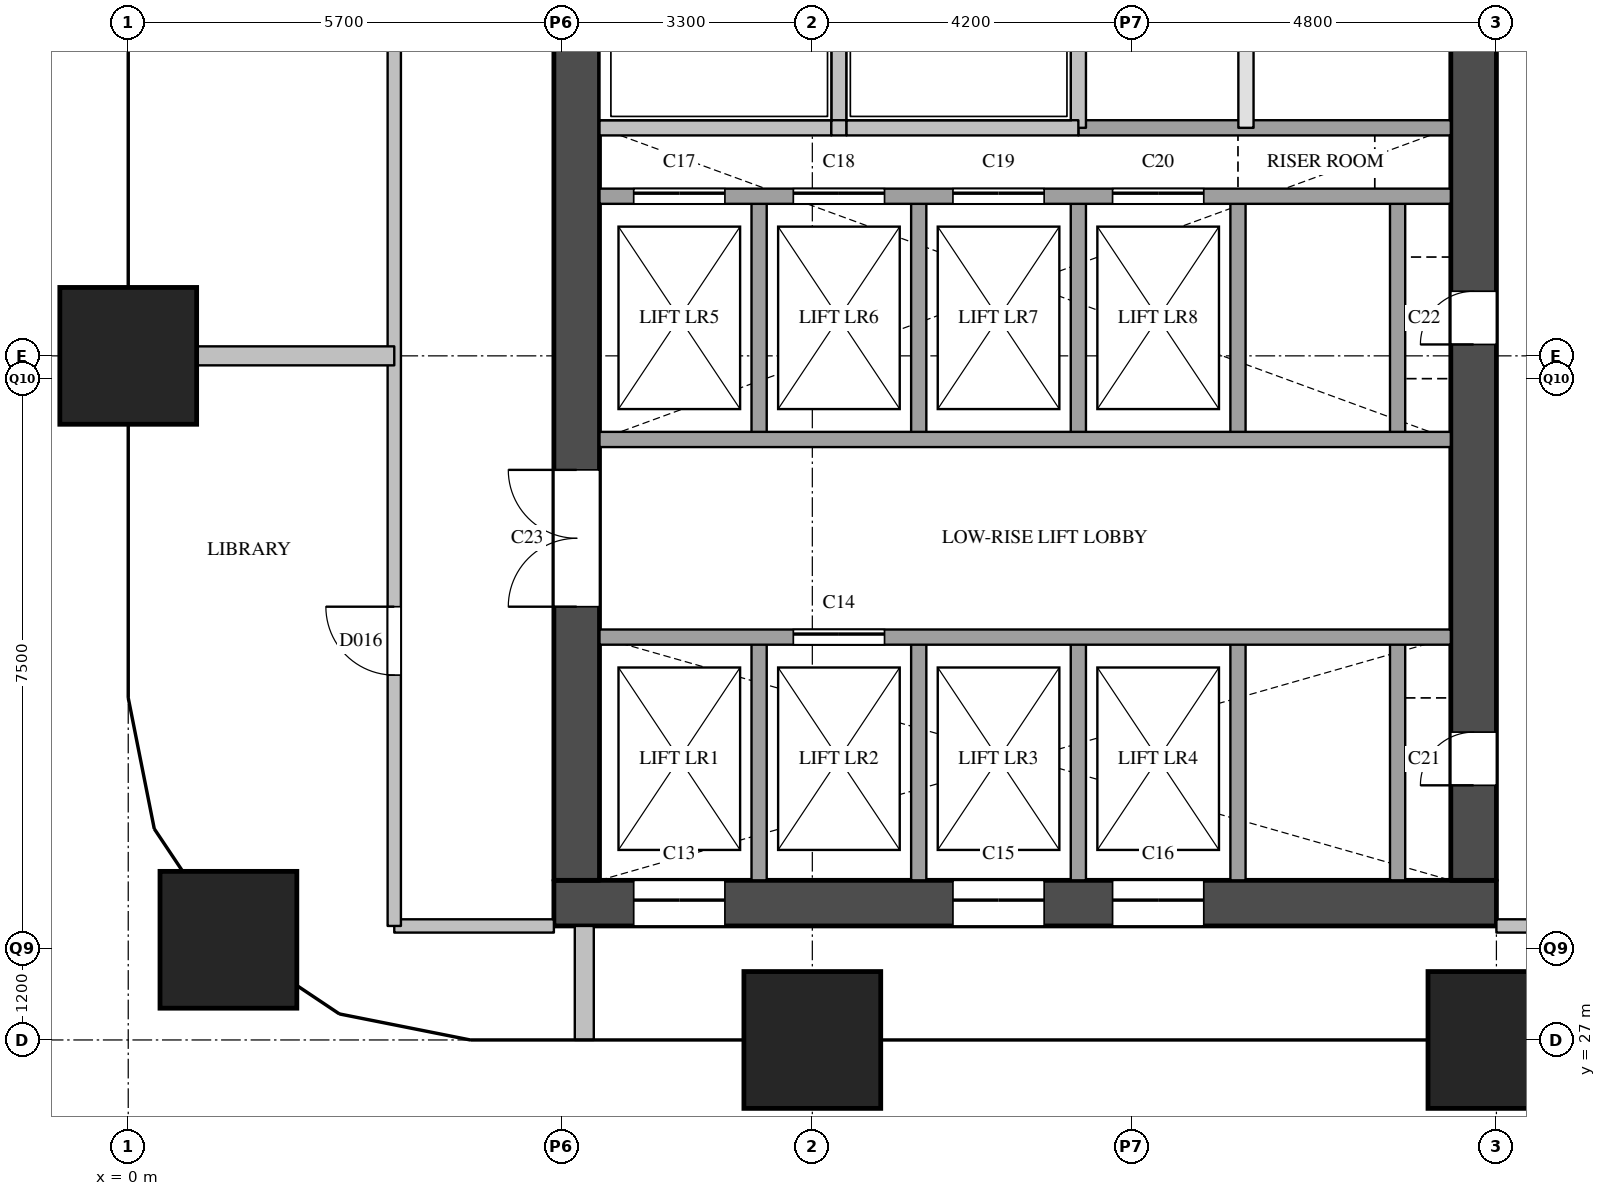
"""IFC4 building model, lengths in metres.
Left out: names, types, materials, properties, quantities, classifications, styles, units other than length and angle.
Written with IfcOpenShell. Run it as: python <this file> out.ifc"""

import sys

from ifc_helpers import new_model, si_unit, direction, frame, frame_2d, origin, origin_2d, place, context, subcontext, project, spatial, rectangle, extrude, element, fill, save


model = new_model("IFC4")
c1 = context("Model", 3, precision=1e-05, world=origin(), true_north=direction((0.0, 1.0)))
c2 = subcontext(c1, "Body", "Model", "MODEL_VIEW")
j1 = project(units=[si_unit("LENGTHUNIT", "METRE"), si_unit("PLANEANGLEUNIT", "RADIAN")], contexts=[c1])
p1 = place(None, origin())
s1 = spatial("IfcSite", under=j1, at=p1, CompositionType="ELEMENT")
p2 = place(p1, origin())
s2 = spatial("IfcBuilding", under=s1, at=p2, CompositionType="ELEMENT")
p3 = place(p2, frame((0.0, 0.0, 93.0)))
s3 = spatial("IfcBuildingStorey", under=s2, at=p3, CompositionType="ELEMENT", Elevation=93.0)
for number, where, z_axis, x_axis in (
    (1, (1.318, 28.318, 0.0), (0.0, 0.0, 1.0), (1.0, 0.0, 0.0)),
    (2, (0.0, 36.0, 0.0), (0.0, 0.0, 1.0), (1.0, 0.0, 0.0)),
    (3, (9.0, 27.0, 0.0), (0.0, 0.0, 1.0), (1.0, 0.0, 0.0)),
    (4, (18.0, 27.0, 0.0), (0.0, 0.0, 1.0), (1.0, 0.0, 0.0)),
):
    element("IfcColumn", number, at=place(p3, frame(where, z_axis=z_axis, x_axis=x_axis)), inside=s3, PredefinedType="COLUMN", context=c2, shape_type="SweptSolid", body=[
        extrude(rectangle(XDim=1.8, YDim=1.8, at=origin_2d()), origin(), (0.0, 0.0, 1.0), 3.8),
    ])
p4 = place(p3, frame((5.6, 28.8, 0.0), z_axis=(0.0, 0.0, 1.0), x_axis=(1.0, 0.0, 0.0)))
e5 = element("IfcWall", 5, at=p4, inside=s3, PredefinedType="SHEAR", context=c2, shape_type="SweptSolid", body=[
    extrude(rectangle(XDim=12.4, YDim=0.6, at=frame_2d((6.2, 0.0))), origin(), (0.0, 0.0, 1.0), 3.5),
])
p5 = place(p4, frame((1.05, 0.0, 0.0)))
e6 = element("IfcOpeningElement", 6, at=p5, cuts=e5, PredefinedType="OPENING", context=c2, shape_type="SweptSolid", body=[
    extrude(rectangle(XDim=1.2, YDim=2.1, at=frame_2d((0.6, 1.05))), frame((0.0, 0.31, 0.0), z_axis=(0.0, -1.0, 0.0), x_axis=(1.0, 0.0, 0.0)), (0.0, 0.0, 1.0), 0.62),
])
p6 = place(p4, frame((5.25, 0.0, 0.0)))
e7 = element("IfcOpeningElement", 7, at=p6, cuts=e5, PredefinedType="OPENING", context=c2, shape_type="SweptSolid", body=[
    extrude(rectangle(XDim=1.2, YDim=2.1, at=frame_2d((0.6, 1.05))), frame((0.0, 0.31, 0.0), z_axis=(0.0, -1.0, 0.0), x_axis=(1.0, 0.0, 0.0)), (0.0, 0.0, 1.0), 0.62),
])
p7 = place(p4, frame((7.35, 0.0, 0.0)))
e8 = element("IfcOpeningElement", 8, at=p7, cuts=e5, PredefinedType="OPENING", context=c2, shape_type="SweptSolid", body=[
    extrude(rectangle(XDim=1.2, YDim=2.1, at=frame_2d((0.6, 1.05))), frame((0.0, 0.31, 0.0), z_axis=(0.0, -1.0, 0.0), x_axis=(1.0, 0.0, 0.0)), (0.0, 0.0, 1.0), 0.62),
])
p8 = place(p3, frame((5.9, 29.1, 0.0), z_axis=(0.0, 0.0, 1.0), x_axis=(0.0, 1.0, 0.0)))
e9 = element("IfcWall", 9, at=p8, inside=s3, PredefinedType="SHEAR", context=c2, shape_type="SweptSolid", body=[
    extrude(rectangle(XDim=20.3, YDim=0.6, at=frame_2d((10.15, 0.0))), origin(), (0.0, 0.0, 1.0), 3.5),
])
p9 = place(p8, frame((3.6, 0.0, 0.0)))
e10 = element("IfcOpeningElement", 10, at=p9, cuts=e9, PredefinedType="OPENING", context=c2, shape_type="SweptSolid", body=[
    extrude(rectangle(XDim=1.8, YDim=2.1, at=frame_2d((0.9, 1.05))), frame((0.0, 0.31, 0.0), z_axis=(0.0, -1.0, 0.0), x_axis=(1.0, 0.0, 0.0)), (0.0, 0.0, 1.0), 0.62),
])
p10 = place(p8, frame((16.4, 0.0, 0.0)))
e11 = element("IfcOpeningElement", 11, at=p10, cuts=e9, PredefinedType="OPENING", context=c2, shape_type="SweptSolid", body=[
    extrude(rectangle(XDim=1.0, YDim=2.1, at=frame_2d((0.5, 1.05))), frame((0.0, 0.31, 0.0), z_axis=(0.0, -1.0, 0.0), x_axis=(1.0, 0.0, 0.0)), (0.0, 0.0, 1.0), 0.62),
])
p11 = place(p3, frame((17.7, 29.1, 0.0), z_axis=(0.0, 0.0, 1.0), x_axis=(0.0, 1.0, 0.0)))
e12 = element("IfcWall", 12, at=p11, inside=s3, PredefinedType="SHEAR", context=c2, shape_type="SweptSolid", body=[
    extrude(rectangle(XDim=20.3, YDim=0.6, at=frame_2d((10.15, 0.0))), origin(), (0.0, 0.0, 1.0), 3.5),
])
p12 = place(p11, frame((1.25, 0.0, 0.0)))
e13 = element("IfcOpeningElement", 13, at=p12, cuts=e12, PredefinedType="OPENING", context=c2, shape_type="SweptSolid", body=[
    extrude(rectangle(XDim=0.7, YDim=2.1, at=frame_2d((0.35, 1.05))), frame((0.0, 0.31, 0.0), z_axis=(0.0, -1.0, 0.0), x_axis=(1.0, 0.0, 0.0)), (0.0, 0.0, 1.0), 0.62),
])
p13 = place(p11, frame((7.05, 0.0, 0.0)))
e14 = element("IfcOpeningElement", 14, at=p13, cuts=e12, PredefinedType="OPENING", context=c2, shape_type="SweptSolid", body=[
    extrude(rectangle(XDim=0.7, YDim=2.1, at=frame_2d((0.35, 1.05))), frame((0.0, 0.31, 0.0), z_axis=(0.0, -1.0, 0.0), x_axis=(1.0, 0.0, 0.0)), (0.0, 0.0, 1.0), 0.62),
])
p14 = place(p3, frame((8.3, 29.1, 0.0), z_axis=(0.0, 0.0, 1.0), x_axis=(0.0, 1.0, 0.0)))
e15 = element("IfcWall", 15, at=p14, inside=s3, PredefinedType="SOLIDWALL", context=c2, shape_type="SweptSolid", body=[
    extrude(rectangle(XDim=3.2, YDim=0.2, at=frame_2d((1.6, 0.0))), origin(), (0.0, 0.0, 1.0), 3.5),
])
p15 = place(p3, frame((8.3, 34.9, 0.0), z_axis=(0.0, 0.0, 1.0), x_axis=(0.0, 1.0, 0.0)))
e16 = element("IfcWall", 16, at=p15, inside=s3, PredefinedType="SOLIDWALL", context=c2, shape_type="SweptSolid", body=[
    extrude(rectangle(XDim=3.2, YDim=0.2, at=frame_2d((1.6, 0.0))), origin(), (0.0, 0.0, 1.0), 3.5),
])
p16 = place(p3, frame((9.35, 39.0, 0.0), z_axis=(0.0, 0.0, 1.0), x_axis=(0.0, 1.0, 0.0)))
e17 = element("IfcWall", 17, at=p16, inside=s3, PredefinedType="SOLIDWALL", context=c2, shape_type="SweptSolid", body=[
    extrude(rectangle(XDim=1.9, YDim=0.2, at=frame_2d((0.95, 0.0))), origin(), (0.0, 0.0, 1.0), 3.5),
])
p17 = place(p3, frame((10.4, 29.1, 0.0), z_axis=(0.0, 0.0, 1.0), x_axis=(0.0, 1.0, 0.0)))
e18 = element("IfcWall", 18, at=p17, inside=s3, PredefinedType="SOLIDWALL", context=c2, shape_type="SweptSolid", body=[
    extrude(rectangle(XDim=3.2, YDim=0.2, at=frame_2d((1.6, 0.0))), origin(), (0.0, 0.0, 1.0), 3.5),
])
p18 = place(p3, frame((10.4, 34.9, 0.0), z_axis=(0.0, 0.0, 1.0), x_axis=(0.0, 1.0, 0.0)))
e19 = element("IfcWall", 19, at=p18, inside=s3, PredefinedType="SOLIDWALL", context=c2, shape_type="SweptSolid", body=[
    extrude(rectangle(XDim=3.2, YDim=0.2, at=frame_2d((1.6, 0.0))), origin(), (0.0, 0.0, 1.0), 3.5),
])
p19 = place(p3, frame((12.5, 29.1, 0.0), z_axis=(0.0, 0.0, 1.0), x_axis=(0.0, 1.0, 0.0)))
e20 = element("IfcWall", 20, at=p19, inside=s3, PredefinedType="SOLIDWALL", context=c2, shape_type="SweptSolid", body=[
    extrude(rectangle(XDim=3.2, YDim=0.2, at=frame_2d((1.6, 0.0))), origin(), (0.0, 0.0, 1.0), 3.5),
])
p20 = place(p3, frame((12.5, 34.9, 0.0), z_axis=(0.0, 0.0, 1.0), x_axis=(0.0, 1.0, 0.0)))
e21 = element("IfcWall", 21, at=p20, inside=s3, PredefinedType="SOLIDWALL", context=c2, shape_type="SweptSolid", body=[
    extrude(rectangle(XDim=3.2, YDim=0.2, at=frame_2d((1.6, 0.0))), origin(), (0.0, 0.0, 1.0), 3.5),
])
p21 = place(p3, frame((12.5, 39.0, 0.0), z_axis=(0.0, 0.0, 1.0), x_axis=(0.0, 1.0, 0.0)))
e22 = element("IfcWall", 22, at=p21, inside=s3, PredefinedType="SOLIDWALL", context=c2, shape_type="SweptSolid", body=[
    extrude(rectangle(XDim=1.9, YDim=0.2, at=frame_2d((0.95, 0.0))), origin(), (0.0, 0.0, 1.0), 3.5),
])
p22 = place(p3, frame((14.6, 29.1, 0.0), z_axis=(0.0, 0.0, 1.0), x_axis=(0.0, 1.0, 0.0)))
e23 = element("IfcWall", 23, at=p22, inside=s3, PredefinedType="SOLIDWALL", context=c2, shape_type="SweptSolid", body=[
    extrude(rectangle(XDim=3.2, YDim=0.2, at=frame_2d((1.6, 0.0))), origin(), (0.0, 0.0, 1.0), 3.5),
])
p23 = place(p3, frame((14.6, 34.9, 0.0), z_axis=(0.0, 0.0, 1.0), x_axis=(0.0, 1.0, 0.0)))
e24 = element("IfcWall", 24, at=p23, inside=s3, PredefinedType="SOLIDWALL", context=c2, shape_type="SweptSolid", body=[
    extrude(rectangle(XDim=3.2, YDim=0.2, at=frame_2d((1.6, 0.0))), origin(), (0.0, 0.0, 1.0), 3.5),
])
p24 = place(p3, frame((14.705, 39.0, 0.0), z_axis=(0.0, 0.0, 1.0), x_axis=(0.0, 1.0, 0.0)))
e25 = element("IfcWall", 25, at=p24, inside=s3, PredefinedType="PARTITIONING", context=c2, shape_type="SweptSolid", body=[
    extrude(rectangle(XDim=6.2, YDim=0.2, at=frame_2d((3.1, 0.0))), origin(), (0.0, 0.0, 1.0), 3.5),
])
p25 = place(p3, frame((16.7, 29.1, 0.0), z_axis=(0.0, 0.0, 1.0), x_axis=(0.0, 1.0, 0.0)))
e26 = element("IfcWall", 26, at=p25, inside=s3, PredefinedType="SOLIDWALL", context=c2, shape_type="SweptSolid", body=[
    extrude(rectangle(XDim=3.2, YDim=0.2, at=frame_2d((1.6, 0.0))), origin(), (0.0, 0.0, 1.0), 3.5),
])
p26 = place(p3, frame((16.7, 34.9, 0.0), z_axis=(0.0, 0.0, 1.0), x_axis=(0.0, 1.0, 0.0)))
e27 = element("IfcWall", 27, at=p26, inside=s3, PredefinedType="SOLIDWALL", context=c2, shape_type="SweptSolid", body=[
    extrude(rectangle(XDim=3.2, YDim=0.2, at=frame_2d((1.6, 0.0))), origin(), (0.0, 0.0, 1.0), 3.5),
])
p27 = place(p3, frame((6.2, 32.3, 0.0), z_axis=(0.0, 0.0, 1.0), x_axis=(1.0, 0.0, 0.0)))
e28 = element("IfcWall", 28, at=p27, inside=s3, PredefinedType="SOLIDWALL", context=c2, shape_type="SweptSolid", body=[
    extrude(rectangle(XDim=11.2, YDim=0.2, at=frame_2d((5.6, 0.0))), origin(), (0.0, 0.0, 1.0), 3.5),
])
p28 = place(p27, frame((2.55, 0.0, 0.0)))
e29 = element("IfcOpeningElement", 29, at=p28, cuts=e28, PredefinedType="OPENING", context=c2, shape_type="SweptSolid", body=[
    extrude(rectangle(XDim=1.2, YDim=2.1, at=frame_2d((0.6, 1.05))), frame((0.0, 0.11, 0.0), z_axis=(0.0, -1.0, 0.0), x_axis=(1.0, 0.0, 0.0)), (0.0, 0.0, 1.0), 0.22),
])
p29 = place(p3, frame((6.2, 34.9, 0.0), z_axis=(0.0, 0.0, 1.0), x_axis=(1.0, 0.0, 0.0)))
e30 = element("IfcWall", 30, at=p29, inside=s3, PredefinedType="SOLIDWALL", context=c2, shape_type="SweptSolid", body=[
    extrude(rectangle(XDim=11.2, YDim=0.2, at=frame_2d((5.6, 0.0))), origin(), (0.0, 0.0, 1.0), 3.5),
])
p30 = place(p3, frame((6.2, 38.1, 0.0), z_axis=(0.0, 0.0, 1.0), x_axis=(1.0, 0.0, 0.0)))
e31 = element("IfcWall", 31, at=p30, inside=s3, PredefinedType="SOLIDWALL", context=c2, shape_type="SweptSolid", body=[
    extrude(rectangle(XDim=11.2, YDim=0.2, at=frame_2d((5.6, 0.0))), origin(), (0.0, 0.0, 1.0), 3.5),
])
p31 = place(p30, frame((0.45, 0.0, 0.0)))
e32 = element("IfcOpeningElement", 32, at=p31, cuts=e31, PredefinedType="OPENING", context=c2, shape_type="SweptSolid", body=[
    extrude(rectangle(XDim=1.2, YDim=2.1, at=frame_2d((0.6, 1.05))), frame((0.0, 0.11, 0.0), z_axis=(0.0, -1.0, 0.0), x_axis=(1.0, 0.0, 0.0)), (0.0, 0.0, 1.0), 0.22),
])
p32 = place(p30, frame((2.55, 0.0, 0.0)))
e33 = element("IfcOpeningElement", 33, at=p32, cuts=e31, PredefinedType="OPENING", context=c2, shape_type="SweptSolid", body=[
    extrude(rectangle(XDim=1.2, YDim=2.1, at=frame_2d((0.6, 1.05))), frame((0.0, 0.11, 0.0), z_axis=(0.0, -1.0, 0.0), x_axis=(1.0, 0.0, 0.0)), (0.0, 0.0, 1.0), 0.22),
])
p33 = place(p30, frame((4.65, 0.0, 0.0)))
e34 = element("IfcOpeningElement", 34, at=p33, cuts=e31, PredefinedType="OPENING", context=c2, shape_type="SweptSolid", body=[
    extrude(rectangle(XDim=1.2, YDim=2.1, at=frame_2d((0.6, 1.05))), frame((0.0, 0.11, 0.0), z_axis=(0.0, -1.0, 0.0), x_axis=(1.0, 0.0, 0.0)), (0.0, 0.0, 1.0), 0.22),
])
p34 = place(p30, frame((6.75, 0.0, 0.0)))
e35 = element("IfcOpeningElement", 35, at=p34, cuts=e31, PredefinedType="OPENING", context=c2, shape_type="SweptSolid", body=[
    extrude(rectangle(XDim=1.2, YDim=2.1, at=frame_2d((0.6, 1.05))), frame((0.0, 0.11, 0.0), z_axis=(0.0, -1.0, 0.0), x_axis=(1.0, 0.0, 0.0)), (0.0, 0.0, 1.0), 0.22),
])
p35 = place(p3, frame((12.5, 39.0, 0.0), z_axis=(0.0, 0.0, 1.0), x_axis=(1.0, 0.0, 0.0)))
e36 = element("IfcWall", 36, at=p35, inside=s3, PredefinedType="SOLIDWALL", context=c2, shape_type="SweptSolid", body=[
    extrude(rectangle(XDim=4.9, YDim=0.2, at=frame_2d((2.45, 0.0))), origin(), (0.0, 0.0, 1.0), 3.5),
])
p36 = place(p3, frame((6.2, 39.0, 0.0), z_axis=(0.0, 0.0, 1.0), x_axis=(1.0, 0.0, 0.0)))
e37 = element("IfcWall", 37, at=p36, inside=s3, PredefinedType="SOLIDWALL", context=c2, shape_type="SweptSolid", body=[
    extrude(rectangle(XDim=3.05, YDim=0.2, at=frame_2d((1.525, 0.0))), origin(), (0.0, 0.0, 1.0), 3.5),
])
p37 = place(p3, frame((9.25, 39.0, 0.0), z_axis=(0.0, 0.0, 1.0), x_axis=(1.0, 0.0, 0.0)))
e38 = element("IfcWall", 38, at=p37, inside=s3, PredefinedType="SOLIDWALL", context=c2, shape_type="SweptSolid", body=[
    extrude(rectangle(XDim=0.2, YDim=0.2, at=frame_2d((0.1, 0.0))), origin(), (0.0, 0.0, 1.0), 3.5),
])
p38 = place(p3, frame((9.45, 39.0, 0.0), z_axis=(0.0, 0.0, 1.0), x_axis=(1.0, 0.0, 0.0)))
e39 = element("IfcWall", 39, at=p38, inside=s3, PredefinedType="SOLIDWALL", context=c2, shape_type="SweptSolid", body=[
    extrude(rectangle(XDim=3.05, YDim=0.2, at=frame_2d((1.525, 0.0))), origin(), (0.0, 0.0, 1.0), 3.5),
])
for number, where, z_axis, x_axis in (
    (40, (3.5, 28.5, 0.0), (0.0, 0.0, 1.0), (1.0, 0.0, 0.0)),
    (41, (18.0, 28.5, 0.0), (0.0, 0.0, 1.0), (1.0, 0.0, 0.0)),
):
    element("IfcWall", number, at=place(p3, frame(where, z_axis=z_axis, x_axis=x_axis)), inside=s3, PredefinedType="PARTITIONING", context=c2, shape_type="SweptSolid", body=[
        extrude(rectangle(XDim=2.1, YDim=0.175, at=frame_2d((1.05, 0.0))), origin(), (0.0, 0.0, 1.0), 3.5),
    ])
p39 = place(p3, frame((3.5, 28.5, 0.0), z_axis=(0.0, 0.0, 1.0), x_axis=(0.0, 1.0, 0.0)))
e42 = element("IfcWall", 42, at=p39, inside=s3, PredefinedType="PARTITIONING", context=c2, shape_type="SweptSolid", body=[
    extrude(rectangle(XDim=23.6, YDim=0.175, at=frame_2d((11.8, 0.0))), origin(), (0.0, 0.0, 1.0), 3.5),
])
p40 = place(p39, frame((3.3, 0.0, 0.0)))
e43 = element("IfcOpeningElement", 43, at=p40, cuts=e42, PredefinedType="OPENING", context=c2, shape_type="SweptSolid", body=[
    extrude(rectangle(XDim=0.9, YDim=2.1, at=frame_2d((0.45, 1.05))), frame((0.0, 0.097, 0.0), z_axis=(0.0, -1.0, 0.0), x_axis=(1.0, 0.0, 0.0)), (0.0, 0.0, 1.0), 0.195),
])
p41 = place(p39, frame((15.1, 0.0, 0.0)))
e44 = element("IfcOpeningElement", 44, at=p41, cuts=e42, PredefinedType="OPENING", context=c2, shape_type="SweptSolid", body=[
    extrude(rectangle(XDim=0.9, YDim=2.1, at=frame_2d((0.45, 1.05))), frame((0.0, 0.097, 0.0), z_axis=(0.0, -1.0, 0.0), x_axis=(1.0, 0.0, 0.0)), (0.0, 0.0, 1.0), 0.195),
])
p42 = place(p3, frame((0.0, 36.0, 0.0), z_axis=(0.0, 0.0, 1.0), x_axis=(1.0, 0.0, 0.0)))
e45 = element("IfcWall", 45, at=p42, inside=s3, PredefinedType="PARTITIONING", context=c2, shape_type="SweptSolid", body=[
    extrude(rectangle(XDim=3.5, YDim=0.25, at=frame_2d((1.75, 0.0))), origin(), (0.0, 0.0, 1.0), 3.5),
])
p43 = place(p3, frame((6.0, 27.0, 0.0), z_axis=(0.0, 0.0, 1.0), x_axis=(0.0, 1.0, 0.0)))
e46 = element("IfcWall", 46, at=p43, inside=s3, PredefinedType="PARTITIONING", context=c2, shape_type="SweptSolid", body=[
    extrude(rectangle(XDim=1.5, YDim=0.25, at=frame_2d((0.75, 0.0))), origin(), (0.0, 0.0, 1.0), 2.5),
])
p44 = place(p5, origin())
e47 = element("IfcDoor", 47, at=p44, inside=s3, OperationType="SLIDING_TO_LEFT", PredefinedType="DOOR", context=c2, shape_type="SweptSolid", body=[
    extrude(rectangle(XDim=1.2, YDim=2.1, at=frame_2d((0.6, 1.05))), frame((0.0, 0.025, 0.0), z_axis=(0.0, -1.0, 0.0), x_axis=(1.0, 0.0, 0.0)), (0.0, 0.0, 1.0), 0.05),
])
fill(e6, e47)
p45 = place(p28, origin())
e48 = element("IfcDoor", 48, at=p45, inside=s3, OperationType="SLIDING_TO_LEFT", PredefinedType="DOOR", context=c2, shape_type="SweptSolid", body=[
    extrude(rectangle(XDim=1.2, YDim=2.1, at=frame_2d((0.6, 1.05))), frame((0.0, 0.025, 0.0), z_axis=(0.0, -1.0, 0.0), x_axis=(1.0, 0.0, 0.0)), (0.0, 0.0, 1.0), 0.05),
])
fill(e29, e48)
p46 = place(p6, origin())
e49 = element("IfcDoor", 49, at=p46, inside=s3, OperationType="SLIDING_TO_LEFT", PredefinedType="DOOR", context=c2, shape_type="SweptSolid", body=[
    extrude(rectangle(XDim=1.2, YDim=2.1, at=frame_2d((0.6, 1.05))), frame((0.0, 0.025, 0.0), z_axis=(0.0, -1.0, 0.0), x_axis=(1.0, 0.0, 0.0)), (0.0, 0.0, 1.0), 0.05),
])
fill(e7, e49)
p47 = place(p7, origin())
e50 = element("IfcDoor", 50, at=p47, inside=s3, OperationType="SLIDING_TO_LEFT", PredefinedType="DOOR", context=c2, shape_type="SweptSolid", body=[
    extrude(rectangle(XDim=1.2, YDim=2.1, at=frame_2d((0.6, 1.05))), frame((0.0, 0.025, 0.0), z_axis=(0.0, -1.0, 0.0), x_axis=(1.0, 0.0, 0.0)), (0.0, 0.0, 1.0), 0.05),
])
fill(e8, e50)
p48 = place(p31, origin())
e51 = element("IfcDoor", 51, at=p48, inside=s3, OperationType="SLIDING_TO_LEFT", PredefinedType="DOOR", context=c2, shape_type="SweptSolid", body=[
    extrude(rectangle(XDim=1.2, YDim=2.1, at=frame_2d((0.6, 1.05))), frame((0.0, 0.025, 0.0), z_axis=(0.0, -1.0, 0.0), x_axis=(1.0, 0.0, 0.0)), (0.0, 0.0, 1.0), 0.05),
])
fill(e32, e51)
p49 = place(p32, origin())
e52 = element("IfcDoor", 52, at=p49, inside=s3, OperationType="SLIDING_TO_LEFT", PredefinedType="DOOR", context=c2, shape_type="SweptSolid", body=[
    extrude(rectangle(XDim=1.2, YDim=2.1, at=frame_2d((0.6, 1.05))), frame((0.0, 0.025, 0.0), z_axis=(0.0, -1.0, 0.0), x_axis=(1.0, 0.0, 0.0)), (0.0, 0.0, 1.0), 0.05),
])
fill(e33, e52)
p50 = place(p33, origin())
e53 = element("IfcDoor", 53, at=p50, inside=s3, OperationType="SLIDING_TO_LEFT", PredefinedType="DOOR", context=c2, shape_type="SweptSolid", body=[
    extrude(rectangle(XDim=1.2, YDim=2.1, at=frame_2d((0.6, 1.05))), frame((0.0, 0.025, 0.0), z_axis=(0.0, -1.0, 0.0), x_axis=(1.0, 0.0, 0.0)), (0.0, 0.0, 1.0), 0.05),
])
fill(e34, e53)
p51 = place(p34, origin())
e54 = element("IfcDoor", 54, at=p51, inside=s3, OperationType="SLIDING_TO_LEFT", PredefinedType="DOOR", context=c2, shape_type="SweptSolid", body=[
    extrude(rectangle(XDim=1.2, YDim=2.1, at=frame_2d((0.6, 1.05))), frame((0.0, 0.025, 0.0), z_axis=(0.0, -1.0, 0.0), x_axis=(1.0, 0.0, 0.0)), (0.0, 0.0, 1.0), 0.05),
])
fill(e35, e54)
p52 = place(p12, origin())
e55 = element("IfcDoor", 55, at=p52, inside=s3, OperationType="SINGLE_SWING_LEFT", PredefinedType="DOOR", context=c2, shape_type="SweptSolid", body=[
    extrude(rectangle(XDim=0.7, YDim=2.1, at=frame_2d((0.35, 1.05))), frame((0.0, 0.025, 0.0), z_axis=(0.0, -1.0, 0.0), x_axis=(1.0, 0.0, 0.0)), (0.0, 0.0, 1.0), 0.05),
])
fill(e13, e55)
p53 = place(p13, origin())
e56 = element("IfcDoor", 56, at=p53, inside=s3, OperationType="SINGLE_SWING_LEFT", PredefinedType="DOOR", context=c2, shape_type="SweptSolid", body=[
    extrude(rectangle(XDim=0.7, YDim=2.1, at=frame_2d((0.35, 1.05))), frame((0.0, 0.025, 0.0), z_axis=(0.0, -1.0, 0.0), x_axis=(1.0, 0.0, 0.0)), (0.0, 0.0, 1.0), 0.05),
])
fill(e14, e56)
p54 = place(p9, origin())
e57 = element("IfcDoor", 57, at=p54, inside=s3, OperationType="DOUBLE_DOOR_SINGLE_SWING", PredefinedType="DOOR", context=c2, shape_type="SweptSolid", body=[
    extrude(rectangle(XDim=1.8, YDim=2.1, at=frame_2d((0.9, 1.05))), frame((0.0, 0.025, 0.0), z_axis=(0.0, -1.0, 0.0), x_axis=(1.0, 0.0, 0.0)), (0.0, 0.0, 1.0), 0.05),
])
fill(e10, e57)
p55 = place(p40, origin())
e58 = element("IfcDoor", 58, at=p55, inside=s3, OperationType="SINGLE_SWING_RIGHT", PredefinedType="DOOR", context=c2, shape_type="SweptSolid", body=[
    extrude(rectangle(XDim=0.9, YDim=2.1, at=frame_2d((0.45, 1.05))), frame((0.0, 0.025, 0.0), z_axis=(0.0, -1.0, 0.0), x_axis=(1.0, 0.0, 0.0)), (0.0, 0.0, 1.0), 0.05),
])
fill(e43, e58)
save(model, sys.argv[1])
